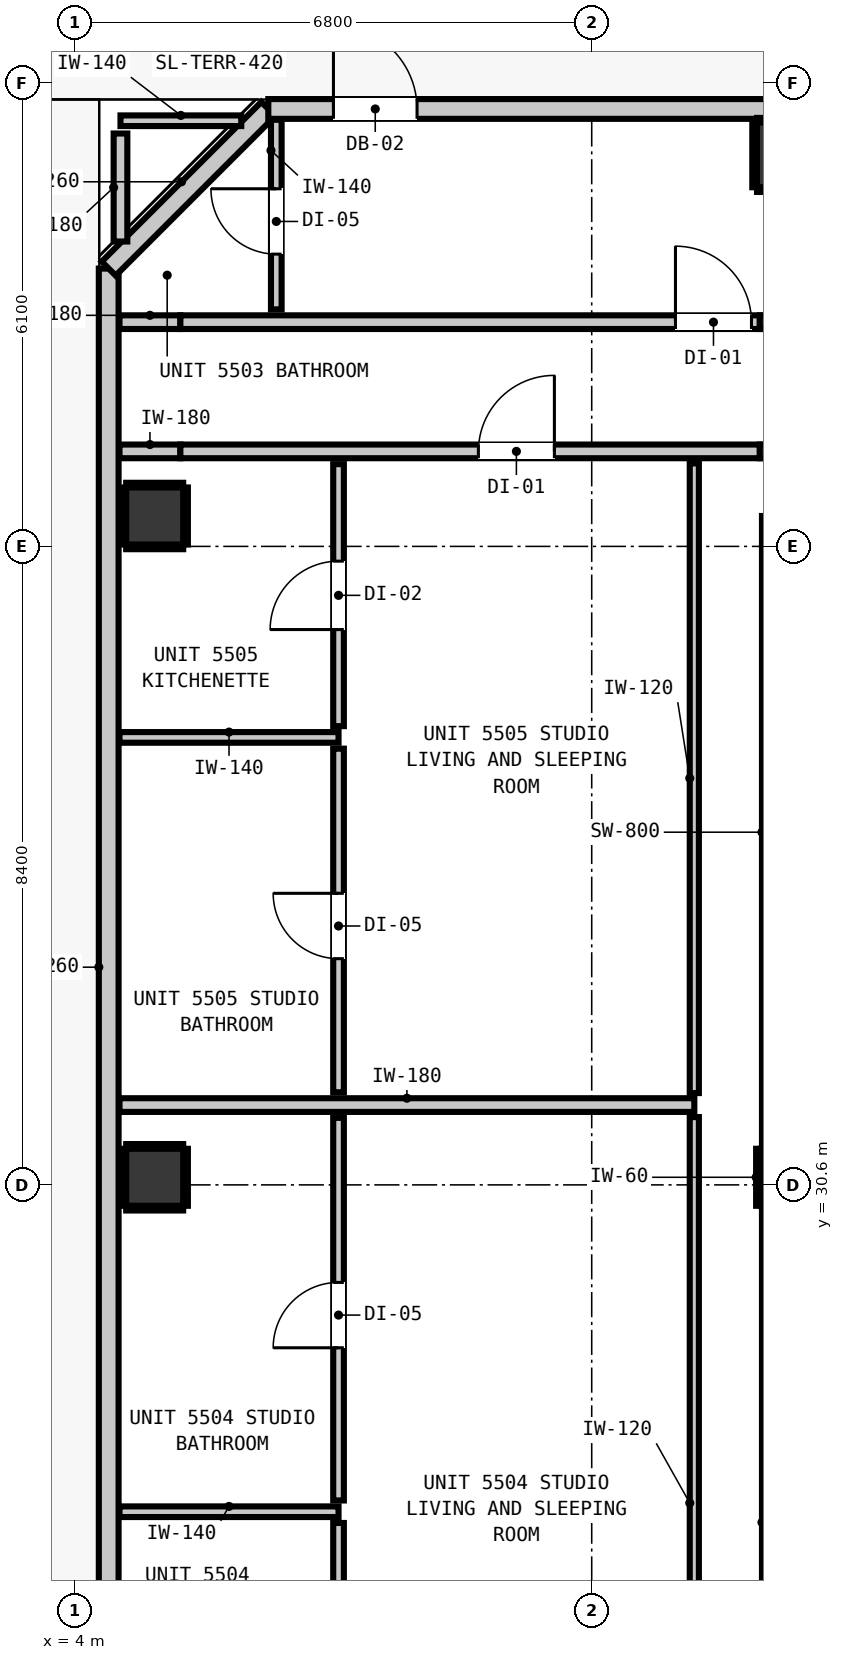
"""IFC4 building model, lengths in metres.
Left out: names, types, materials, properties, quantities, classifications, styles, units other than length and angle.
Written with IfcOpenShell. Run it as: python <this file> out.ifc"""

import sys

from ifc_helpers import new_model, si_unit, direction, frame, frame_2d, origin, origin_2d, place, context, subcontext, project, spatial, rectangle, extrude, element, fill, save


model = new_model("IFC4")
c1 = context("Model", 3, precision=1e-05, world=origin(), true_north=direction((0.0, 1.0)))
c2 = subcontext(c1, "Body", "Model", "MODEL_VIEW")
j1 = project(units=[si_unit("LENGTHUNIT", "METRE"), si_unit("PLANEANGLEUNIT", "RADIAN")], contexts=[c1])
p1 = place(None, origin())
s1 = spatial("IfcSite", under=j1, at=p1, CompositionType="ELEMENT")
p2 = place(p1, origin())
s2 = spatial("IfcBuilding", under=s1, at=p2, CompositionType="ELEMENT")
p3 = place(p2, frame((0.0, 0.0, 190.16)))
s3 = spatial("IfcBuildingStorey", under=s2, at=p3, CompositionType="ELEMENT", Elevation=190.16)
p4 = place(p3, frame((13.4, 30.7, 0.0), z_axis=(0.0, 0.0, 1.0), x_axis=(1.0, 0.0, 0.0)))
e1 = element("IfcColumn", 1, at=p4, inside=s3, PredefinedType="COLUMN", context=c2, shape_type="SweptSolid", body=[
    extrude(rectangle(XDim=0.75, YDim=0.75, at=origin_2d()), origin(), (0.0, 0.0, 1.0), 3.32),
])
p5 = place(p3, frame((13.44, 22.0, 0.0), z_axis=(0.0, 0.0, 1.0), x_axis=(0.0, 1.0, 0.0)))
e2 = element("IfcWall", 2, at=p5, inside=s3, PredefinedType="SHEAR", context=c2, shape_type="SweptSolid", body=[
    extrude(rectangle(XDim=8.32, YDim=0.8, at=frame_2d((4.16, 0.0))), origin(), (0.0, 0.0, 1.0), 3.32),
])
p6 = place(p3, frame((13.44, 31.08, 0.0), z_axis=(0.0, 0.0, 1.0), x_axis=(0.0, 1.0, 0.0)))
e3 = element("IfcWall", 3, at=p6, inside=s3, PredefinedType="SHEAR", context=c2, shape_type="SweptSolid", body=[
    extrude(rectangle(XDim=8.32, YDim=0.8, at=frame_2d((4.16, 0.0))), origin(), (0.0, 0.0, 1.0), 3.32),
])
p7 = place(p3, frame((13.4, 44.15, -0.2), z_axis=(0.0, 0.0, 1.0), x_axis=(1.0, 0.0, 0.0)))
e4 = element("IfcColumn", 4, at=p7, inside=s3, PredefinedType="COLUMN", context=c2, shape_type="SweptSolid", body=[
    extrude(rectangle(XDim=0.85, YDim=0.85, at=origin_2d()), origin(), (0.0, 0.0, 1.0), 3.52),
])
for number, where, z_axis, x_axis in (
    (5, (5.05, 30.7, -0.2), (0.0, 0.0, 1.0), (1.0, 0.0, 0.0)),
    (6, (5.05, 39.4, -0.2), (0.0, 0.0, 1.0), (1.0, 0.0, 0.0)),
):
    element("IfcColumn", number, at=place(p3, frame(where, z_axis=z_axis, x_axis=x_axis)), inside=s3, PredefinedType="COLUMN", context=c2, shape_type="SweptSolid", body=[
        extrude(rectangle(XDim=0.75, YDim=0.75, at=origin_2d()), origin(), (0.0, 0.0, 1.0), 3.52),
    ])
p8 = place(p3, frame((4.445, 12.345, 0.0), z_axis=(0.0, 0.0, 1.0), x_axis=(0.0, 1.0, 0.0)))
e7 = element("IfcWall", 7, at=p8, inside=s3, PredefinedType="STANDARD", context=c2, shape_type="SweptSolid", body=[
    extrude(rectangle(XDim=30.31, YDim=0.26, at=frame_2d((15.155, 0.0))), origin(), (0.0, 0.0, 1.0), 3.1),
])
p9 = place(p8, frame((10.728, 0.0, 0.0)))
e8 = element("IfcOpeningElement", 8, at=p9, cuts=e7, PredefinedType="OPENING", context=c2, shape_type="SweptSolid", body=[
    extrude(rectangle(XDim=1.1, YDim=2.15, at=frame_2d((0.55, 1.075))), frame((0.0, 0.14, 0.0), z_axis=(0.0, -1.0, 0.0), x_axis=(1.0, 0.0, 0.0)), (0.0, 0.0, 1.0), 0.28),
])
p10 = place(p8, frame((0.252, 0.0, 0.85)))
e9 = element("IfcOpeningElement", 9, at=p10, cuts=e7, PredefinedType="OPENING", context=c2, shape_type="SweptSolid", body=[
    extrude(rectangle(XDim=2.7, YDim=2.0, at=frame_2d((1.35, 1.0))), frame((0.0, 0.14, 0.0), z_axis=(0.0, -1.0, 0.0), x_axis=(1.0, 0.0, 0.0)), (0.0, 0.0, 1.0), 0.28),
])
p11 = place(p3, frame((4.445, 42.655, 0.0), z_axis=(0.0, 0.0, 1.0), x_axis=(0.707106781187, 0.707106781187, 0.0)))
e10 = element("IfcWall", 10, at=p11, inside=s3, PredefinedType="STANDARD", context=c2, shape_type="SweptSolid", body=[
    extrude(rectangle(XDim=2.97, YDim=0.26, at=frame_2d((1.485, 0.0))), origin(), (0.0, 0.0, 1.0), 3.1),
])
p12 = place(p3, frame((6.545, 44.755, 0.0), z_axis=(0.0, 0.0, 1.0), x_axis=(1.0, 0.0, 0.0)))
e11 = element("IfcWall", 11, at=p12, inside=s3, PredefinedType="STANDARD", context=c2, shape_type="SweptSolid", body=[
    extrude(rectangle(XDim=32.71, YDim=0.26, at=frame_2d((16.355, 0.0))), origin(), (0.0, 0.0, 1.0), 3.1),
])
p13 = place(p12, frame((0.857, 0.0, 0.0)))
e12 = element("IfcOpeningElement", 12, at=p13, cuts=e11, PredefinedType="OPENING", context=c2, shape_type="SweptSolid", body=[
    extrude(rectangle(XDim=1.1, YDim=2.15, at=frame_2d((0.55, 1.075))), frame((0.0, 0.14, 0.0), z_axis=(0.0, -1.0, 0.0), x_axis=(1.0, 0.0, 0.0)), (0.0, 0.0, 1.0), 0.28),
])
p14 = place(p12, frame((8.577, 0.0, 0.85)))
e13 = element("IfcOpeningElement", 13, at=p14, cuts=e11, PredefinedType="OPENING", context=c2, shape_type="SweptSolid", body=[
    extrude(rectangle(XDim=2.7, YDim=2.0, at=frame_2d((1.35, 1.0))), frame((0.0, 0.14, 0.0), z_axis=(0.0, -1.0, 0.0), x_axis=(1.0, 0.0, 0.0)), (0.0, 0.0, 1.0), 0.28),
])
p15 = place(p12, frame((24.955, 0.0, 0.85)))
e14 = element("IfcOpeningElement", 14, at=p15, cuts=e11, PredefinedType="OPENING", context=c2, shape_type="SweptSolid", body=[
    extrude(rectangle(XDim=2.7, YDim=2.0, at=frame_2d((1.35, 1.0))), frame((0.0, 0.14, 0.0), z_axis=(0.0, -1.0, 0.0), x_axis=(1.0, 0.0, 0.0)), (0.0, 0.0, 1.0), 0.28),
])
p16 = place(p3, frame((4.587, 31.65, 0.0), z_axis=(0.0, 0.0, 1.0), x_axis=(1.0, 0.0, 0.0)))
e15 = element("IfcWall", 15, at=p16, inside=s3, PredefinedType="PARTITIONING", context=c2, shape_type="SweptSolid", body=[
    extrude(rectangle(XDim=7.563, YDim=0.18, at=frame_2d((3.781, 0.0))), origin(), (0.0, 0.0, 1.0), 3.1),
])
p17 = place(p3, frame((4.587, 40.25, 0.0), z_axis=(0.0, 0.0, 1.0), x_axis=(1.0, 0.0, 0.0)))
e16 = element("IfcWall", 16, at=p17, inside=s3, PredefinedType="PARTITIONING", context=c2, shape_type="SweptSolid", body=[
    extrude(rectangle(XDim=0.801, YDim=0.18, at=frame_2d((0.4, 0.0))), origin(), (0.0, 0.0, 1.0), 3.1),
])
p18 = place(p3, frame((5.388, 40.25, 0.0), z_axis=(0.0, 0.0, 1.0), x_axis=(1.0, 0.0, 0.0)))
e17 = element("IfcWall", 17, at=p18, inside=s3, PredefinedType="PARTITIONING", context=c2, shape_type="SweptSolid", body=[
    extrude(rectangle(XDim=7.624, YDim=0.18, at=frame_2d((3.812, 0.0))), origin(), (0.0, 0.0, 1.0), 2.477),
])
p19 = place(p18, frame((3.921, 0.0, 0.0)))
e18 = element("IfcOpeningElement", 18, at=p19, cuts=e17, PredefinedType="OPENING", context=c2, shape_type="SweptSolid", body=[
    extrude(rectangle(XDim=1.0, YDim=2.15, at=frame_2d((0.5, 1.075))), frame((0.0, 0.1, 0.0), z_axis=(0.0, -1.0, 0.0), x_axis=(1.0, 0.0, 0.0)), (0.0, 0.0, 1.0), 0.2),
])
p20 = place(p3, frame((13.012, 40.25, 0.0), z_axis=(0.0, 0.0, 1.0), x_axis=(1.0, 0.0, 0.0)))
e19 = element("IfcWall", 19, at=p20, inside=s3, PredefinedType="PARTITIONING", context=c2, shape_type="SweptSolid", body=[
    extrude(rectangle(XDim=28.201, YDim=0.18, at=frame_2d((14.101, 0.0))), origin(), (0.0, 0.0, 1.0), 3.1),
])
p21 = place(p20, frame((4.423, 0.0, 0.0)))
e20 = element("IfcOpeningElement", 20, at=p21, cuts=e19, PredefinedType="OPENING", context=c2, shape_type="SweptSolid", body=[
    extrude(rectangle(XDim=1.4, YDim=2.15, at=frame_2d((0.7, 1.075))), frame((0.0, 0.1, 0.0), z_axis=(0.0, -1.0, 0.0), x_axis=(1.0, 0.0, 0.0)), (0.0, 0.0, 1.0), 0.2),
])
p22 = place(p3, frame((4.587, 41.95, 0.0), z_axis=(0.0, 0.0, 1.0), x_axis=(1.0, 0.0, 0.0)))
e21 = element("IfcWall", 21, at=p22, inside=s3, PredefinedType="PARTITIONING", context=c2, shape_type="SweptSolid", body=[
    extrude(rectangle(XDim=0.801, YDim=0.18, at=frame_2d((0.4, 0.0))), origin(), (0.0, 0.0, 1.0), 3.1),
])
p23 = place(p3, frame((5.388, 41.95, 0.0), z_axis=(0.0, 0.0, 1.0), x_axis=(1.0, 0.0, 0.0)))
e22 = element("IfcWall", 22, at=p23, inside=s3, PredefinedType="PARTITIONING", context=c2, shape_type="SweptSolid", body=[
    extrude(rectangle(XDim=7.624, YDim=0.18, at=frame_2d((3.812, 0.0))), origin(), (0.0, 0.0, 1.0), 2.477),
])
p24 = place(p23, frame((6.514, 0.0, 0.0)))
e23 = element("IfcOpeningElement", 23, at=p24, cuts=e22, PredefinedType="OPENING", context=c2, shape_type="SweptSolid", body=[
    extrude(rectangle(XDim=1.0, YDim=2.15, at=frame_2d((0.5, 1.075))), frame((0.0, 0.1, 0.0), z_axis=(0.0, -1.0, 0.0), x_axis=(1.0, 0.0, 0.0)), (0.0, 0.0, 1.0), 0.2),
])
p25 = place(p3, frame((13.012, 41.95, 0.0), z_axis=(0.0, 0.0, 1.0), x_axis=(1.0, 0.0, 0.0)))
e24 = element("IfcWall", 24, at=p25, inside=s3, PredefinedType="PARTITIONING", context=c2, shape_type="SweptSolid", body=[
    extrude(rectangle(XDim=28.201, YDim=0.18, at=frame_2d((14.101, 0.0))), origin(), (0.0, 0.0, 1.0), 3.1),
])
p26 = place(p25, frame((18.783, 0.0, 0.0)))
e25 = element("IfcOpeningElement", 25, at=p26, cuts=e24, PredefinedType="OPENING", context=c2, shape_type="SweptSolid", body=[
    extrude(rectangle(XDim=0.9, YDim=2.1, at=frame_2d((0.45, 1.05))), frame((0.0, 0.1, 0.0), z_axis=(0.0, -1.0, 0.0), x_axis=(1.0, 0.0, 0.0)), (0.0, 0.0, 1.0), 0.2),
])
for number, where, z_axis, x_axis in (
    (26, (4.587, 26.3, 0.0), (0.0, 0.0, 1.0), (1.0, 0.0, 0.0)),
    (27, (4.587, 36.487, 0.0), (0.0, 0.0, 1.0), (1.0, 0.0, 0.0)),
):
    element("IfcWall", number, at=place(p3, frame(where, z_axis=z_axis, x_axis=x_axis)), inside=s3, PredefinedType="PARTITIONING", context=c2, shape_type="SweptSolid", body=[
        extrude(rectangle(XDim=2.882, YDim=0.14, at=frame_2d((1.441, 0.0))), origin(), (0.0, 0.0, 1.0), 3.1),
    ])
p27 = place(p3, frame((4.6, 44.6, 0.0), z_axis=(0.0, 0.0, 1.0), x_axis=(1.0, 0.0, 0.0)))
e28 = element("IfcWall", 28, at=p27, inside=s3, PredefinedType="PARTITIONING", context=c2, shape_type="SweptSolid", body=[
    extrude(rectangle(XDim=1.589, YDim=0.14, at=frame_2d((0.794, 0.0))), origin(), (0.0, 0.0, 1.0), 3.1),
])
p28 = place(p3, frame((4.6, 43.011, 0.0), z_axis=(0.0, 0.0, 1.0), x_axis=(0.0, 1.0, 0.0)))
e29 = element("IfcWall", 29, at=p28, inside=s3, PredefinedType="PARTITIONING", context=c2, shape_type="SweptSolid", body=[
    extrude(rectangle(XDim=1.421, YDim=0.18, at=frame_2d((0.71, 0.0))), origin(), (0.0, 0.0, 1.0), 3.1),
])
p29 = place(p3, frame((6.65, 42.118, 0.0), z_axis=(0.0, 0.0, 1.0), x_axis=(0.0, 1.0, 0.0)))
e30 = element("IfcWall", 30, at=p29, inside=s3, PredefinedType="PARTITIONING", context=c2, shape_type="SweptSolid", body=[
    extrude(rectangle(XDim=2.495, YDim=0.14, at=frame_2d((1.248, 0.0))), origin(), (0.0, 0.0, 1.0), 3.1),
])
p30 = place(p29, frame((0.727, 0.0, 0.0)))
e31 = element("IfcOpeningElement", 31, at=p30, cuts=e30, PredefinedType="OPENING", context=c2, shape_type="SweptSolid", body=[
    extrude(rectangle(XDim=0.86, YDim=2.02, at=frame_2d((0.43, 1.01))), frame((0.0, 0.08, 0.0), z_axis=(0.0, -1.0, 0.0), x_axis=(1.0, 0.0, 0.0)), (0.0, 0.0, 1.0), 0.16),
])
p31 = place(p3, frame((7.469, 21.348, 0.0), z_axis=(0.0, 0.0, 1.0), x_axis=(0.0, 1.0, 0.0)))
e32 = element("IfcWall", 32, at=p31, inside=s3, PredefinedType="PARTITIONING", context=c2, shape_type="SweptSolid", body=[
    extrude(rectangle(XDim=4.804, YDim=0.14, at=frame_2d((2.402, 0.0))), origin(), (0.0, 0.0, 1.0), 3.1),
])
p32 = place(p31, frame((1.94, 0.0, 0.0)))
e33 = element("IfcOpeningElement", 33, at=p32, cuts=e32, PredefinedType="OPENING", context=c2, shape_type="SweptSolid", body=[
    extrude(rectangle(XDim=0.9, YDim=2.1, at=frame_2d((0.45, 1.05))), frame((0.0, 0.08, 0.0), z_axis=(0.0, -1.0, 0.0), x_axis=(1.0, 0.0, 0.0)), (0.0, 0.0, 1.0), 0.16),
])
p33 = place(p3, frame((7.469, 26.448, 0.0), z_axis=(0.0, 0.0, 1.0), x_axis=(0.0, 1.0, 0.0)))
e34 = element("IfcWall", 34, at=p33, inside=s3, PredefinedType="PARTITIONING", context=c2, shape_type="SweptSolid", body=[
    extrude(rectangle(XDim=5.034, YDim=0.14, at=frame_2d((2.517, 0.0))), origin(), (0.0, 0.0, 1.0), 3.1),
])
p34 = place(p33, frame((2.009, 0.0, 0.0)))
e35 = element("IfcOpeningElement", 35, at=p34, cuts=e34, PredefinedType="OPENING", context=c2, shape_type="SweptSolid", body=[
    extrude(rectangle(XDim=0.86, YDim=2.02, at=frame_2d((0.43, 1.01))), frame((0.0, 0.08, 0.0), z_axis=(0.0, -1.0, 0.0), x_axis=(1.0, 0.0, 0.0)), (0.0, 0.0, 1.0), 0.16),
])
p35 = place(p3, frame((7.469, 31.818, 0.0), z_axis=(0.0, 0.0, 1.0), x_axis=(0.0, 1.0, 0.0)))
e36 = element("IfcWall", 36, at=p35, inside=s3, PredefinedType="PARTITIONING", context=c2, shape_type="SweptSolid", body=[
    extrude(rectangle(XDim=4.521, YDim=0.14, at=frame_2d((2.26, 0.0))), origin(), (0.0, 0.0, 1.0), 3.1),
])
p36 = place(p35, frame((1.758, 0.0, 0.0)))
e37 = element("IfcOpeningElement", 37, at=p36, cuts=e36, PredefinedType="OPENING", context=c2, shape_type="SweptSolid", body=[
    extrude(rectangle(XDim=0.86, YDim=2.02, at=frame_2d((0.43, 1.01))), frame((0.0, 0.08, 0.0), z_axis=(0.0, -1.0, 0.0), x_axis=(1.0, 0.0, 0.0)), (0.0, 0.0, 1.0), 0.16),
])
p37 = place(p3, frame((7.469, 36.635, 0.0), z_axis=(0.0, 0.0, 1.0), x_axis=(0.0, 1.0, 0.0)))
e38 = element("IfcWall", 38, at=p37, inside=s3, PredefinedType="PARTITIONING", context=c2, shape_type="SweptSolid", body=[
    extrude(rectangle(XDim=3.447, YDim=0.14, at=frame_2d((1.724, 0.0))), origin(), (0.0, 0.0, 1.0), 3.1),
])
p38 = place(p37, frame((1.271, 0.0, 0.0)))
e39 = element("IfcOpeningElement", 39, at=p38, cuts=e38, PredefinedType="OPENING", context=c2, shape_type="SweptSolid", body=[
    extrude(rectangle(XDim=0.9, YDim=2.1, at=frame_2d((0.45, 1.05))), frame((0.0, 0.08, 0.0), z_axis=(0.0, -1.0, 0.0), x_axis=(1.0, 0.0, 0.0)), (0.0, 0.0, 1.0), 0.16),
])
p39 = place(p3, frame((12.15, 21.338, 0.0), z_axis=(0.0, 0.0, 1.0), x_axis=(0.0, 1.0, 0.0)))
e40 = element("IfcWall", 40, at=p39, inside=s3, PredefinedType="PARTITIONING", context=c2, shape_type="SweptSolid", body=[
    extrude(rectangle(XDim=10.154, YDim=0.12, at=frame_2d((5.077, 0.0))), origin(), (0.0, 0.0, 1.0), 3.1),
])
p40 = place(p3, frame((12.15, 31.808, 0.0), z_axis=(0.0, 0.0, 1.0), x_axis=(0.0, 1.0, 0.0)))
e41 = element("IfcWall", 41, at=p40, inside=s3, PredefinedType="PARTITIONING", context=c2, shape_type="SweptSolid", body=[
    extrude(rectangle(XDim=8.284, YDim=0.12, at=frame_2d((4.142, 0.0))), origin(), (0.0, 0.0, 1.0), 3.1),
])
p41 = place(p3, frame((12.993, 30.325, 0.0), z_axis=(0.0, 0.0, 1.0), x_axis=(0.0, 1.0, 0.0)))
e42 = element("IfcWall", 42, at=p41, inside=s3, PredefinedType="PARTITIONING", context=c2, shape_type="SweptSolid", body=[
    extrude(rectangle(XDim=0.75, YDim=0.06, at=frame_2d((0.375, 0.0))), origin(), (0.0, 0.0, 1.0), 1.45),
])
for number, where, z_axis, x_axis in (
    (43, (12.975, 43.693, 0.0), (0.0, 0.0, 1.0), (1.0, 0.0, 0.0)),
    (44, (12.975, 44.607, 0.0), (0.0, 0.0, 1.0), (1.0, 0.0, 0.0)),
    (45, (12.943, 43.725, 0.0), (0.0, 0.0, 1.0), (0.0, 1.0, 0.0)),
):
    element("IfcWall", number, at=place(p3, frame(where, z_axis=z_axis, x_axis=x_axis)), inside=s3, PredefinedType="PARTITIONING", context=c2, shape_type="SweptSolid", body=[
        extrude(rectangle(XDim=0.85, YDim=0.06, at=frame_2d((0.425, 0.0))), origin(), (0.0, 0.0, 1.0), 1.45),
    ])
for number, where, z_axis, x_axis in (
    (46, (4.675, 30.293, 0.0), (0.0, 0.0, 1.0), (1.0, 0.0, 0.0)),
    (47, (4.675, 31.107, 0.0), (0.0, 0.0, 1.0), (1.0, 0.0, 0.0)),
    (48, (4.643, 30.325, 0.0), (0.0, 0.0, 1.0), (0.0, 1.0, 0.0)),
    (49, (5.457, 30.325, 0.0), (0.0, 0.0, 1.0), (0.0, 1.0, 0.0)),
    (50, (4.675, 38.993, 0.0), (0.0, 0.0, 1.0), (1.0, 0.0, 0.0)),
    (51, (4.675, 39.807, 0.0), (0.0, 0.0, 1.0), (1.0, 0.0, 0.0)),
    (52, (4.643, 39.025, 0.0), (0.0, 0.0, 1.0), (0.0, 1.0, 0.0)),
    (53, (5.457, 39.025, 0.0), (0.0, 0.0, 1.0), (0.0, 1.0, 0.0)),
):
    element("IfcWall", number, at=place(p3, frame(where, z_axis=z_axis, x_axis=x_axis)), inside=s3, PredefinedType="PARTITIONING", context=c2, shape_type="SweptSolid", body=[
        extrude(rectangle(XDim=0.75, YDim=0.06, at=frame_2d((0.375, 0.0))), origin(), (0.0, 0.0, 1.0), 1.45),
    ])
p42 = place(p13, origin())
e54 = element("IfcDoor", 54, at=p42, inside=s3, OperationType="SINGLE_SWING_LEFT", PredefinedType="DOOR", context=c2, shape_type="SweptSolid", body=[
    extrude(rectangle(XDim=1.1, YDim=2.15, at=frame_2d((0.55, 1.075))), frame((0.0, 0.025, 0.0), z_axis=(0.0, -1.0, 0.0), x_axis=(1.0, 0.0, 0.0)), (0.0, 0.0, 1.0), 0.05),
])
fill(e12, e54)
p43 = place(p24, origin())
e55 = element("IfcDoor", 55, at=p43, inside=s3, OperationType="SINGLE_SWING_LEFT", PredefinedType="DOOR", context=c2, shape_type="SweptSolid", body=[
    extrude(rectangle(XDim=1.0, YDim=2.15, at=frame_2d((0.5, 1.075))), frame((0.0, 0.025, 0.0), z_axis=(0.0, -1.0, 0.0), x_axis=(1.0, 0.0, 0.0)), (0.0, 0.0, 1.0), 0.05),
])
fill(e23, e55)
p44 = place(p30, origin())
e56 = element("IfcDoor", 56, at=p44, inside=s3, OperationType="SINGLE_SWING_RIGHT", PredefinedType="DOOR", context=c2, shape_type="SweptSolid", body=[
    extrude(rectangle(XDim=0.86, YDim=2.02, at=frame_2d((0.43, 1.01))), frame((0.0, 0.025, 0.0), z_axis=(0.0, -1.0, 0.0), x_axis=(1.0, 0.0, 0.0)), (0.0, 0.0, 1.0), 0.05),
])
fill(e31, e56)
p45 = place(p34, origin())
e57 = element("IfcDoor", 57, at=p45, inside=s3, OperationType="SINGLE_SWING_LEFT", PredefinedType="DOOR", context=c2, shape_type="SweptSolid", body=[
    extrude(rectangle(XDim=0.86, YDim=2.02, at=frame_2d((0.43, 1.01))), frame((0.0, 0.025, 0.0), z_axis=(0.0, -1.0, 0.0), x_axis=(1.0, 0.0, 0.0)), (0.0, 0.0, 1.0), 0.05),
])
fill(e35, e57)
p46 = place(p19, origin())
e58 = element("IfcDoor", 58, at=p46, inside=s3, OperationType="SINGLE_SWING_RIGHT", PredefinedType="DOOR", context=c2, shape_type="SweptSolid", body=[
    extrude(rectangle(XDim=1.0, YDim=2.15, at=frame_2d((0.5, 1.075))), frame((0.0, 0.025, 0.0), z_axis=(0.0, -1.0, 0.0), x_axis=(1.0, 0.0, 0.0)), (0.0, 0.0, 1.0), 0.05),
])
fill(e18, e58)
p47 = place(p38, origin())
e59 = element("IfcDoor", 59, at=p47, inside=s3, OperationType="SINGLE_SWING_LEFT", PredefinedType="DOOR", context=c2, shape_type="SweptSolid", body=[
    extrude(rectangle(XDim=0.9, YDim=2.1, at=frame_2d((0.45, 1.05))), frame((0.0, 0.025, 0.0), z_axis=(0.0, -1.0, 0.0), x_axis=(1.0, 0.0, 0.0)), (0.0, 0.0, 1.0), 0.05),
])
fill(e39, e59)
p48 = place(p36, origin())
e60 = element("IfcDoor", 60, at=p48, inside=s3, OperationType="SINGLE_SWING_RIGHT", PredefinedType="DOOR", context=c2, shape_type="SweptSolid", body=[
    extrude(rectangle(XDim=0.86, YDim=2.02, at=frame_2d((0.43, 1.01))), frame((0.0, 0.025, 0.0), z_axis=(0.0, -1.0, 0.0), x_axis=(1.0, 0.0, 0.0)), (0.0, 0.0, 1.0), 0.05),
])
fill(e37, e60)
save(model, sys.argv[1])
